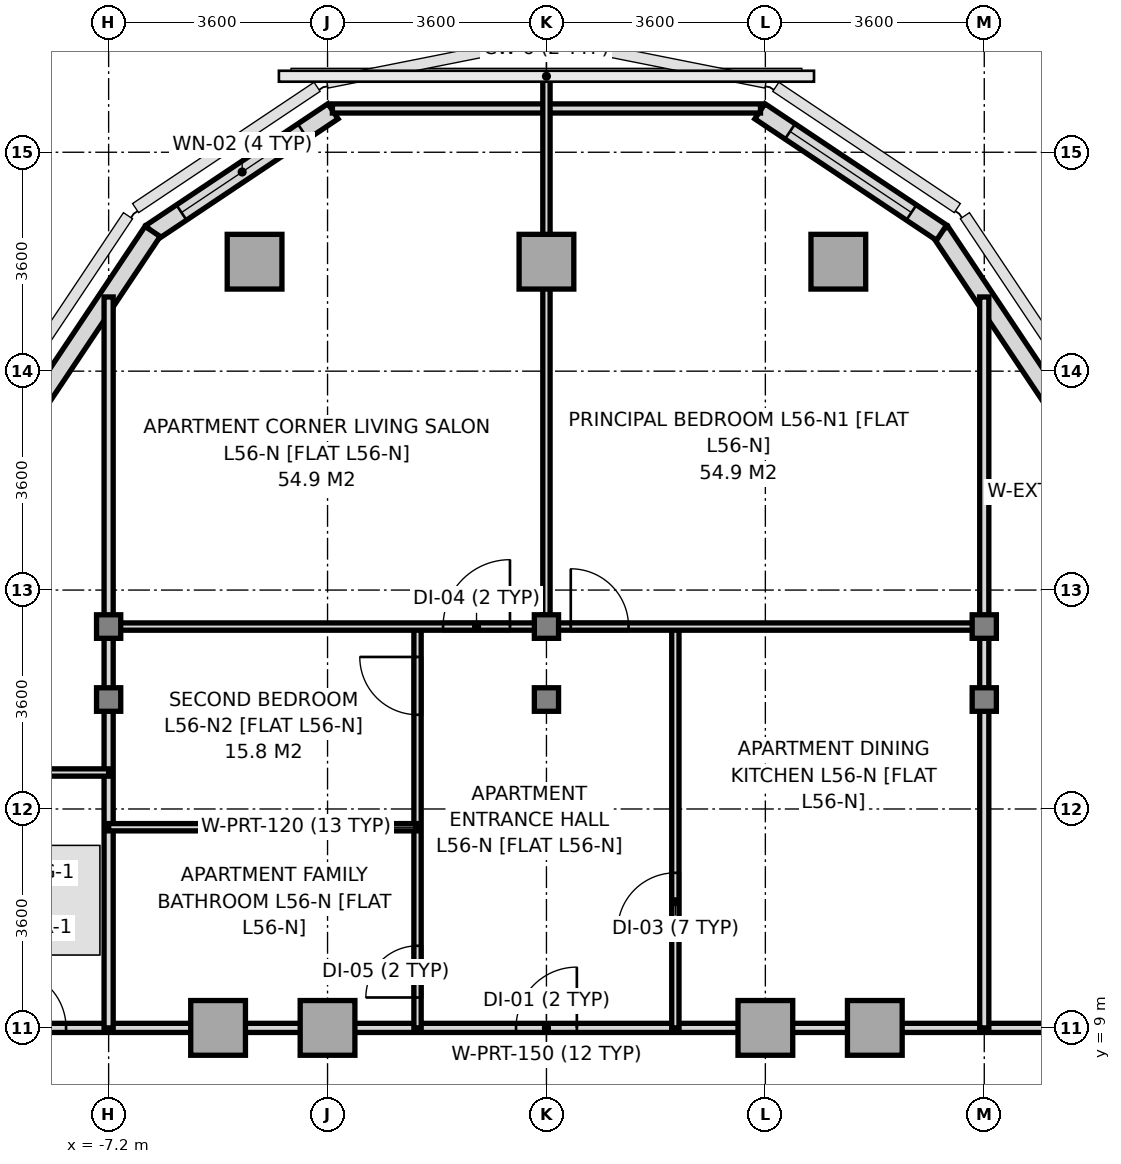
"""IFC4 building model, lengths in metres.
Left out: names, types, materials, properties, quantities, classifications, styles, units other than length and angle.
Written with IfcOpenShell. Run it as: python <this file> out.ifc"""

import sys

from ifc_helpers import new_model, si_unit, direction, frame, frame_2d, origin, origin_2d, place, context, subcontext, project, spatial, rectangle, i_section, extrude, source, transform, mapped, element, fill, save


model = new_model("IFC4")
c1 = context("Model", 3, precision=1e-05, world=origin(), true_north=direction((0.0, 1.0)))
c2 = subcontext(c1, "Body", "Model", "MODEL_VIEW")
j1 = project(units=[si_unit("LENGTHUNIT", "METRE"), si_unit("PLANEANGLEUNIT", "RADIAN")], contexts=[c1])
p1 = place(None, origin())
s1 = spatial("IfcSite", under=j1, at=p1, CompositionType="ELEMENT")
p2 = place(p1, origin())
s2 = spatial("IfcBuilding", under=s1, at=p2, CompositionType="ELEMENT")
p3 = place(p2, frame((0.0, 0.0, 204.6)))
s3 = spatial("IfcBuildingStorey", under=s2, at=p3, CompositionType="ELEMENT", Elevation=204.6)
m1 = source(origin(), c2, "Body", "SweptSolid", [
    extrude(i_section(OverallWidth=0.398, OverallDepth=0.387, WebThickness=0.018, FlangeThickness=0.028, at=origin_2d()), origin(), (0.0, 0.0, 1.0), 3.2),
])
for number, where, z_axis, x_axis in (
    (1, (-7.2, 14.4, 0.0), (0.0, 0.0, 1.0), (1.0, 0.0, 0.0)),
    (2, (-7.2, 15.6, 0.0), (0.0, 0.0, 1.0), (1.0, 0.0, 0.0)),
):
    element("IfcColumn", number, at=place(p3, frame(where, z_axis=z_axis, x_axis=x_axis)), inside=s3, PredefinedType="COLUMN", context=c2, shape_type="MappedRepresentation", body=[
        mapped(m1, transform((0.0, 0.0, 0.0), x_axis=(1.0, 0.0, 0.0), y_axis=(0.0, 1.0, 0.0), z_axis=(0.0, 0.0, 1.0), scale=1.0)),
    ])
m2 = source(origin(), c2, "Body", "SweptSolid", [
    extrude(rectangle(XDim=0.9, YDim=0.9, at=origin_2d()), origin(), (0.0, 0.0, 1.0), 3.2),
])
for number, where, z_axis, x_axis in (
    (3, (-5.4, 9.0, 0.0), (0.0, 0.0, 1.0), (1.0, 0.0, 0.0)),
    (4, (-4.8, 21.6, 0.0), (0.0, 0.0, 1.0), (1.0, 0.0, 0.0)),
    (5, (-3.6, 9.0, 0.0), (0.0, 0.0, 1.0), (1.0, 0.0, 0.0)),
):
    element("IfcColumn", number, at=place(p3, frame(where, z_axis=z_axis, x_axis=x_axis)), inside=s3, PredefinedType="COLUMN", context=c2, shape_type="MappedRepresentation", body=[
        mapped(m2, transform((0.0, 0.0, 0.0), x_axis=(1.0, 0.0, 0.0), y_axis=(0.0, 1.0, 0.0), z_axis=(0.0, 0.0, 1.0), scale=1.0)),
    ])
for number, where, z_axis, x_axis in (
    (6, (0.0, 14.4, 0.0), (0.0, 0.0, 1.0), (1.0, 0.0, 0.0)),
    (7, (0.0, 15.6, 0.0), (0.0, 0.0, 1.0), (1.0, 0.0, 0.0)),
):
    element("IfcColumn", number, at=place(p3, frame(where, z_axis=z_axis, x_axis=x_axis)), inside=s3, PredefinedType="COLUMN", context=c2, shape_type="MappedRepresentation", body=[
        mapped(m1, transform((0.0, 0.0, 0.0), x_axis=(1.0, 0.0, 0.0), y_axis=(0.0, 1.0, 0.0), z_axis=(0.0, 0.0, 1.0), scale=1.0)),
    ])
for number, where, z_axis, x_axis in (
    (8, (0.0, 21.6, 0.0), (0.0, 0.0, 1.0), (1.0, 0.0, 0.0)),
    (9, (3.6, 9.0, 0.0), (0.0, 0.0, 1.0), (1.0, 0.0, 0.0)),
    (10, (4.8, 21.6, 0.0), (0.0, 0.0, 1.0), (1.0, 0.0, 0.0)),
    (11, (5.4, 9.0, 0.0), (0.0, 0.0, 1.0), (1.0, 0.0, 0.0)),
):
    element("IfcColumn", number, at=place(p3, frame(where, z_axis=z_axis, x_axis=x_axis)), inside=s3, PredefinedType="COLUMN", context=c2, shape_type="MappedRepresentation", body=[
        mapped(m2, transform((0.0, 0.0, 0.0), x_axis=(1.0, 0.0, 0.0), y_axis=(0.0, 1.0, 0.0), z_axis=(0.0, 0.0, 1.0), scale=1.0)),
    ])
for number, where, z_axis, x_axis in (
    (12, (7.2, 14.4, 0.0), (0.0, 0.0, 1.0), (1.0, 0.0, 0.0)),
    (13, (7.2, 15.6, 0.0), (0.0, 0.0, 1.0), (1.0, 0.0, 0.0)),
):
    element("IfcColumn", number, at=place(p3, frame(where, z_axis=z_axis, x_axis=x_axis)), inside=s3, PredefinedType="COLUMN", context=c2, shape_type="MappedRepresentation", body=[
        mapped(m1, transform((0.0, 0.0, 0.0), x_axis=(1.0, 0.0, 0.0), y_axis=(0.0, 1.0, 0.0), z_axis=(0.0, 0.0, 1.0), scale=1.0)),
    ])
p4 = place(p3, frame((8.482, 19.097, 0.0), z_axis=(0.0, 0.0, 1.0), x_axis=(-0.555574187116, 0.831466970246, 0.0)))
e14 = element("IfcWall", 14, at=p4, inside=s3, PredefinedType="SOLIDWALL", context=c2, shape_type="SweptSolid", body=[
    extrude(rectangle(XDim=3.609, YDim=0.3, at=frame_2d((1.804, 0.0))), origin(), (0.0, 0.0, 1.0), 3.2),
])
p5 = place(p3, frame((6.498, 22.077, 0.0), z_axis=(0.0, 0.0, 1.0), x_axis=(-0.8314749531, 0.555562239868, 0.0)))
e15 = element("IfcWall", 15, at=p5, inside=s3, PredefinedType="SOLIDWALL", context=c2, shape_type="SweptSolid", body=[
    extrude(rectangle(XDim=3.593, YDim=0.3, at=frame_2d((1.797, 0.0))), origin(), (0.0, 0.0, 1.0), 3.2),
])
p6 = place(p5, frame((0.597, 0.0, 0.8)))
e16 = element("IfcOpeningElement", 16, at=p6, cuts=e15, PredefinedType="OPENING", context=c2, shape_type="SweptSolid", body=[
    extrude(rectangle(XDim=2.4, YDim=2.2, at=frame_2d((1.2, 1.1))), frame((0.0, 0.16, 0.0), z_axis=(0.0, -1.0, 0.0), x_axis=(1.0, 0.0, 0.0)), (0.0, 0.0, 1.0), 0.32),
])
p7 = place(p3, frame((-3.51, 24.073, 0.0), z_axis=(0.0, 0.0, 1.0), x_axis=(-0.8314749531, -0.555562239868, 0.0)))
e17 = element("IfcWall", 17, at=p7, inside=s3, PredefinedType="SOLIDWALL", context=c2, shape_type="SweptSolid", body=[
    extrude(rectangle(XDim=3.593, YDim=0.3, at=frame_2d((1.797, 0.0))), origin(), (0.0, 0.0, 1.0), 3.2),
])
p8 = place(p7, frame((0.597, 0.0, 0.8)))
e18 = element("IfcOpeningElement", 18, at=p8, cuts=e17, PredefinedType="OPENING", context=c2, shape_type="SweptSolid", body=[
    extrude(rectangle(XDim=2.4, YDim=2.2, at=frame_2d((1.2, 1.1))), frame((0.0, 0.16, 0.0), z_axis=(0.0, -1.0, 0.0), x_axis=(1.0, 0.0, 0.0)), (0.0, 0.0, 1.0), 0.32),
])
p9 = place(p3, frame((-6.477, 22.098, 0.0), z_axis=(0.0, 0.0, 1.0), x_axis=(-0.555574187116, -0.831466970246, 0.0)))
e19 = element("IfcWall", 19, at=p9, inside=s3, PredefinedType="SOLIDWALL", context=c2, shape_type="SweptSolid", body=[
    extrude(rectangle(XDim=3.609, YDim=0.3, at=frame_2d((1.804, 0.0))), origin(), (0.0, 0.0, 1.0), 3.2),
])
p10 = place(p3, frame((-9.55, 9.0, 0.0), z_axis=(0.0, 0.0, 1.0), x_axis=(1.0, 0.0, 0.0)))
e20 = element("IfcWall", 20, at=p10, inside=s3, PredefinedType="PARTITIONING", context=c2, shape_type="SweptSolid", body=[
    extrude(rectangle(XDim=19.1, YDim=0.15, at=frame_2d((9.55, 0.0))), origin(), (0.0, 0.0, 1.0), 2.75),
])
p11 = place(p10, frame((0.7, 0.0, 0.0)))
e21 = element("IfcOpeningElement", 21, at=p11, cuts=e20, PredefinedType="OPENING", context=c2, shape_type="SweptSolid", body=[
    extrude(rectangle(XDim=0.95, YDim=2.15, at=frame_2d((0.475, 1.075))), frame((0.0, 0.085, 0.0), z_axis=(0.0, -1.0, 0.0), x_axis=(1.0, 0.0, 0.0)), (0.0, 0.0, 1.0), 0.17),
])
p12 = place(p10, frame((9.05, 0.0, 0.0)))
e22 = element("IfcOpeningElement", 22, at=p12, cuts=e20, PredefinedType="OPENING", context=c2, shape_type="SweptSolid", body=[
    extrude(rectangle(XDim=1.0, YDim=2.2, at=frame_2d((0.5, 1.1))), frame((0.0, 0.085, 0.0), z_axis=(0.0, -1.0, 0.0), x_axis=(1.0, 0.0, 0.0)), (0.0, 0.0, 1.0), 0.17),
])
for number, where, z_axis, x_axis in (
    (23, (-7.2, 9.0, 0.0), (0.0, 0.0, 1.0), (0.0, 1.0, 0.0)),
    (24, (7.2, 9.0, 0.0), (0.0, 0.0, 1.0), (0.0, 1.0, 0.0)),
):
    element("IfcWall", number, at=place(p3, frame(where, z_axis=z_axis, x_axis=x_axis)), inside=s3, PredefinedType="PARTITIONING", context=c2, shape_type="SweptSolid", body=[
        extrude(rectangle(XDim=12.02, YDim=0.15, at=frame_2d((6.01, 0.0))), origin(), (0.0, 0.0, 1.0), 2.75),
    ])
p13 = place(p3, frame((-3.52, 24.12, 0.0), z_axis=(0.0, 0.0, 1.0), x_axis=(1.0, 0.0, 0.0)))
e25 = element("IfcWall", 25, at=p13, inside=s3, PredefinedType="PARTITIONING", context=c2, shape_type="SweptSolid", body=[
    extrude(rectangle(XDim=7.04, YDim=0.15, at=frame_2d((3.52, 0.0))), origin(), (0.0, 0.0, 1.0), 3.2),
])
p14 = place(p3, frame((-2.12, 9.0, 0.0), z_axis=(0.0, 0.0, 1.0), x_axis=(0.0, 1.0, 0.0)))
e26 = element("IfcWall", 26, at=p14, inside=s3, PredefinedType="PARTITIONING", context=c2, shape_type="SweptSolid", body=[
    extrude(rectangle(XDim=6.6, YDim=0.12, at=frame_2d((3.3, 0.0))), origin(), (0.0, 0.0, 1.0), 2.75),
])
p15 = place(p14, frame((0.5, 0.0, 0.0)))
e27 = element("IfcOpeningElement", 27, at=p15, cuts=e26, PredefinedType="OPENING", context=c2, shape_type="SweptSolid", body=[
    extrude(rectangle(XDim=0.85, YDim=2.1, at=frame_2d((0.425, 1.05))), frame((0.0, 0.07, 0.0), z_axis=(0.0, -1.0, 0.0), x_axis=(1.0, 0.0, 0.0)), (0.0, 0.0, 1.0), 0.14),
])
p16 = place(p14, frame((5.15, 0.0, 0.0)))
e28 = element("IfcOpeningElement", 28, at=p16, cuts=e26, PredefinedType="OPENING", context=c2, shape_type="SweptSolid", body=[
    extrude(rectangle(XDim=0.95, YDim=2.15, at=frame_2d((0.475, 1.075))), frame((0.0, 0.07, 0.0), z_axis=(0.0, -1.0, 0.0), x_axis=(1.0, 0.0, 0.0)), (0.0, 0.0, 1.0), 0.14),
])
p17 = place(p3, frame((-7.2, 12.3, 0.0), z_axis=(0.0, 0.0, 1.0), x_axis=(1.0, 0.0, 0.0)))
e29 = element("IfcWall", 29, at=p17, inside=s3, PredefinedType="PARTITIONING", context=c2, shape_type="SweptSolid", body=[
    extrude(rectangle(XDim=5.08, YDim=0.12, at=frame_2d((2.54, 0.0))), origin(), (0.0, 0.0, 1.0), 3.2),
])
p18 = place(p3, frame((2.12, 9.0, 0.0), z_axis=(0.0, 0.0, 1.0), x_axis=(0.0, 1.0, 0.0)))
e30 = element("IfcWall", 30, at=p18, inside=s3, PredefinedType="PARTITIONING", context=c2, shape_type="SweptSolid", body=[
    extrude(rectangle(XDim=6.6, YDim=0.12, at=frame_2d((3.3, 0.0))), origin(), (0.0, 0.0, 1.0), 2.75),
])
p19 = place(p18, frame((1.6, 0.0, 0.0)))
e31 = element("IfcOpeningElement", 31, at=p19, cuts=e30, PredefinedType="OPENING", context=c2, shape_type="SweptSolid", body=[
    extrude(rectangle(XDim=0.95, YDim=2.15, at=frame_2d((0.475, 1.075))), frame((0.0, 0.07, 0.0), z_axis=(0.0, -1.0, 0.0), x_axis=(1.0, 0.0, 0.0)), (0.0, 0.0, 1.0), 0.14),
])
p20 = place(p3, frame((-7.2, 15.6, 0.0), z_axis=(0.0, 0.0, 1.0), x_axis=(1.0, 0.0, 0.0)))
e32 = element("IfcWall", 32, at=p20, inside=s3, PredefinedType="PARTITIONING", context=c2, shape_type="SweptSolid", body=[
    extrude(rectangle(XDim=14.4, YDim=0.12, at=frame_2d((7.2, 0.0))), origin(), (0.0, 0.0, 1.0), 2.75),
])
p21 = place(p20, frame((5.5, 0.0, 0.0)))
e33 = element("IfcOpeningElement", 33, at=p21, cuts=e32, PredefinedType="OPENING", context=c2, shape_type="SweptSolid", body=[
    extrude(rectangle(XDim=1.1, YDim=2.2, at=frame_2d((0.55, 1.1))), frame((0.0, 0.07, 0.0), z_axis=(0.0, -1.0, 0.0), x_axis=(1.0, 0.0, 0.0)), (0.0, 0.0, 1.0), 0.14),
])
p22 = place(p20, frame((7.6, 0.0, 0.0)))
e34 = element("IfcOpeningElement", 34, at=p22, cuts=e32, PredefinedType="OPENING", context=c2, shape_type="SweptSolid", body=[
    extrude(rectangle(XDim=0.95, YDim=2.15, at=frame_2d((0.475, 1.075))), frame((0.0, 0.07, 0.0), z_axis=(0.0, -1.0, 0.0), x_axis=(1.0, 0.0, 0.0)), (0.0, 0.0, 1.0), 0.14),
])
p23 = place(p3, frame((0.0, 15.6, 0.0), z_axis=(0.0, 0.0, 1.0), x_axis=(0.0, 1.0, 0.0)))
e35 = element("IfcWall", 35, at=p23, inside=s3, PredefinedType="PARTITIONING", context=c2, shape_type="SweptSolid", body=[
    extrude(rectangle(XDim=9.05, YDim=0.12, at=frame_2d((4.525, 0.0))), origin(), (0.0, 0.0, 1.0), 2.75),
])
p24 = place(p3, frame((-9.5, 13.2, 0.0), z_axis=(0.0, 0.0, 1.0), x_axis=(1.0, 0.0, 0.0)))
e36 = element("IfcWall", 36, at=p24, inside=s3, PredefinedType="PARTITIONING", context=c2, shape_type="SweptSolid", body=[
    extrude(rectangle(XDim=2.3, YDim=0.12, at=frame_2d((1.15, 0.0))), origin(), (0.0, 0.0, 1.0), 3.2),
])
m3 = source(origin(), c2, "Body", "SweptSolid", [
    extrude(rectangle(XDim=2.4, YDim=2.2, at=frame_2d((1.2, 1.1))), frame((0.0, 0.03, 0.0), z_axis=(0.0, -1.0, 0.0), x_axis=(1.0, 0.0, 0.0)), (0.0, 0.0, 1.0), 0.06),
])
p25 = place(p6, origin())
e37 = element("IfcWindow", 37, at=p25, inside=s3, PartitioningType="SINGLE_PANEL", PredefinedType="WINDOW", context=c2, shape_type="MappedRepresentation", body=[
    mapped(m3, transform((0.0, 0.0, 0.0), x_axis=(1.0, 0.0, 0.0), y_axis=(0.0, 1.0, 0.0), z_axis=(0.0, 0.0, 1.0), scale=1.0)),
])
fill(e16, e37)
p26 = place(p8, origin())
e38 = element("IfcWindow", 38, at=p26, inside=s3, PartitioningType="SINGLE_PANEL", PredefinedType="WINDOW", context=c2, shape_type="MappedRepresentation", body=[
    mapped(m3, transform((0.0, 0.0, 0.0), x_axis=(1.0, 0.0, 0.0), y_axis=(0.0, 1.0, 0.0), z_axis=(0.0, 0.0, 1.0), scale=1.0)),
])
fill(e18, e38)
m4 = source(origin(), c2, "Body", "SweptSolid", [
    extrude(rectangle(XDim=0.95, YDim=2.15, at=frame_2d((0.475, 1.075))), frame((0.0, 0.025, 0.0), z_axis=(0.0, -1.0, 0.0), x_axis=(1.0, 0.0, 0.0)), (0.0, 0.0, 1.0), 0.05),
])
p27 = place(p11, origin())
e39 = element("IfcDoor", 39, at=p27, inside=s3, OperationType="SINGLE_SWING_LEFT", PredefinedType="DOOR", context=c2, shape_type="MappedRepresentation", body=[
    mapped(m4, transform((0.0, 0.0, 0.0), x_axis=(1.0, 0.0, 0.0), y_axis=(0.0, 1.0, 0.0), z_axis=(0.0, 0.0, 1.0), scale=1.0)),
])
fill(e21, e39)
m5 = source(origin(), c2, "Body", "SweptSolid", [
    extrude(rectangle(XDim=1.0, YDim=2.2, at=frame_2d((0.5, 1.1))), frame((0.0, 0.025, 0.0), z_axis=(0.0, -1.0, 0.0), x_axis=(1.0, 0.0, 0.0)), (0.0, 0.0, 1.0), 0.05),
])
p28 = place(p12, origin())
e40 = element("IfcDoor", 40, at=p28, inside=s3, OperationType="SINGLE_SWING_RIGHT", PredefinedType="DOOR", context=c2, shape_type="MappedRepresentation", body=[
    mapped(m5, transform((0.0, 0.0, 0.0), x_axis=(1.0, 0.0, 0.0), y_axis=(0.0, 1.0, 0.0), z_axis=(0.0, 0.0, 1.0), scale=1.0)),
])
fill(e22, e40)
m6 = source(origin(), c2, "Body", "SweptSolid", [
    extrude(rectangle(XDim=0.85, YDim=2.1, at=frame_2d((0.425, 1.05))), frame((0.0, 0.025, 0.0), z_axis=(0.0, -1.0, 0.0), x_axis=(1.0, 0.0, 0.0)), (0.0, 0.0, 1.0), 0.05),
])
p29 = place(p15, origin())
e41 = element("IfcDoor", 41, at=p29, inside=s3, OperationType="SINGLE_SWING_LEFT", PredefinedType="DOOR", context=c2, shape_type="MappedRepresentation", body=[
    mapped(m6, transform((0.0, 0.0, 0.0), x_axis=(1.0, 0.0, 0.0), y_axis=(0.0, 1.0, 0.0), z_axis=(0.0, 0.0, 1.0), scale=1.0)),
])
fill(e27, e41)
p30 = place(p16, origin())
e42 = element("IfcDoor", 42, at=p30, inside=s3, OperationType="SINGLE_SWING_RIGHT", PredefinedType="DOOR", context=c2, shape_type="MappedRepresentation", body=[
    mapped(m4, transform((0.0, 0.0, 0.0), x_axis=(1.0, 0.0, 0.0), y_axis=(0.0, 1.0, 0.0), z_axis=(0.0, 0.0, 1.0), scale=1.0)),
])
fill(e28, e42)
p31 = place(p19, origin())
e43 = element("IfcDoor", 43, at=p31, inside=s3, OperationType="SINGLE_SWING_LEFT", PredefinedType="DOOR", context=c2, shape_type="MappedRepresentation", body=[
    mapped(m4, transform((0.0, 0.0, 0.0), x_axis=(1.0, 0.0, 0.0), y_axis=(0.0, 1.0, 0.0), z_axis=(0.0, 0.0, 1.0), scale=1.0)),
])
fill(e31, e43)
m7 = source(origin(), c2, "Body", "SweptSolid", [
    extrude(rectangle(XDim=1.1, YDim=2.2, at=frame_2d((0.55, 1.1))), frame((0.0, 0.025, 0.0), z_axis=(0.0, -1.0, 0.0), x_axis=(1.0, 0.0, 0.0)), (0.0, 0.0, 1.0), 0.05),
])
p32 = place(p21, origin())
e44 = element("IfcDoor", 44, at=p32, inside=s3, OperationType="SINGLE_SWING_RIGHT", PredefinedType="DOOR", context=c2, shape_type="MappedRepresentation", body=[
    mapped(m7, transform((0.0, 0.0, 0.0), x_axis=(1.0, 0.0, 0.0), y_axis=(0.0, 1.0, 0.0), z_axis=(0.0, 0.0, 1.0), scale=1.0)),
])
fill(e33, e44)
p33 = place(p22, origin())
e45 = element("IfcDoor", 45, at=p33, inside=s3, OperationType="SINGLE_SWING_LEFT", PredefinedType="DOOR", context=c2, shape_type="MappedRepresentation", body=[
    mapped(m4, transform((0.0, 0.0, 0.0), x_axis=(1.0, 0.0, 0.0), y_axis=(0.0, 1.0, 0.0), z_axis=(0.0, 0.0, 1.0), scale=1.0)),
])
fill(e34, e45)
save(model, sys.argv[1])
